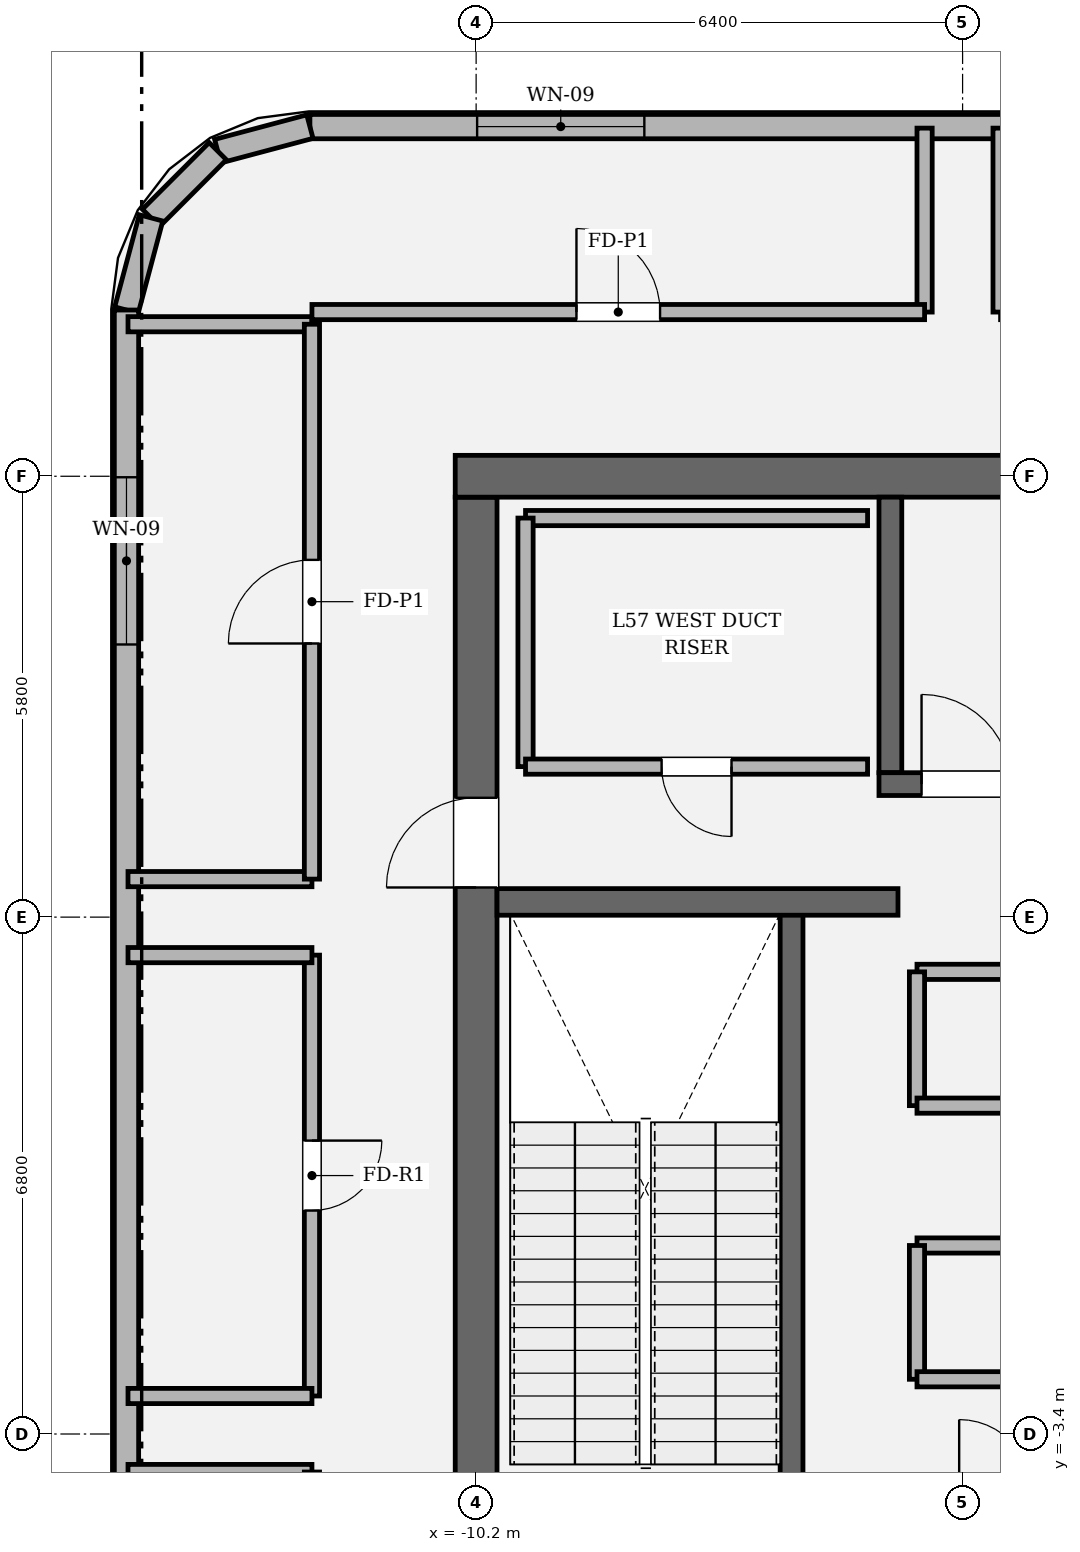
"""IFC4 building model, lengths in metres.
Left out: names, types, materials, properties, quantities, classifications, styles, units other than length and angle.
Written with IfcOpenShell. Run it as: python <this file> out.ifc"""

import sys

from ifc_helpers import new_model, si_unit, direction, frame, frame_2d, origin, place, context, subcontext, project, spatial, rectangle, extrude, element, fill, save


model = new_model("IFC4")
c1 = context("Model", 3, precision=1e-05, world=origin(), true_north=direction((0.0, 1.0)))
c2 = subcontext(c1, "Body", "Model", "MODEL_VIEW")
j1 = project(units=[si_unit("LENGTHUNIT", "METRE"), si_unit("PLANEANGLEUNIT", "RADIAN")], contexts=[c1])
p1 = place(None, origin())
s1 = spatial("IfcSite", under=j1, at=p1, CompositionType="ELEMENT")
p2 = place(p1, origin())
s2 = spatial("IfcBuilding", under=s1, at=p2, CompositionType="ELEMENT")
p3 = place(p2, frame((0.0, 0.0, 241.8)))
s3 = spatial("IfcBuildingStorey", under=s2, at=p3, CompositionType="ELEMENT", Elevation=241.8)
p4 = place(p3, frame((-10.2, -8.925, 0.0), z_axis=(0.0, 0.0, 1.0), x_axis=(0.0, 1.0, 0.0)))
e1 = element("IfcWall", 1, at=p4, inside=s3, PredefinedType="SHEAR", context=c2, shape_type="SweptSolid", body=[
    extrude(rectangle(XDim=17.85, YDim=0.55, at=frame_2d((8.925, 0.0))), origin(), (0.0, 0.0, 1.0), 4.8),
])
p5 = place(p4, frame((12.715, 0.0, 0.0)))
e2 = element("IfcOpeningElement", 2, at=p5, cuts=e1, PredefinedType="OPENING", context=c2, shape_type="SweptSolid", body=[
    extrude(rectangle(XDim=1.18, YDim=2.2, at=frame_2d((0.59, 1.1))), frame((0.0, 0.285, 0.0), z_axis=(0.0, -1.0, 0.0), x_axis=(1.0, 0.0, 0.0)), (0.0, 0.0, 1.0), 0.57),
])
p6 = place(p3, frame((-10.475, 9.2, 0.0), z_axis=(0.0, 0.0, 1.0), x_axis=(1.0, 0.0, 0.0)))
e3 = element("IfcWall", 3, at=p6, inside=s3, PredefinedType="SHEAR", context=c2, shape_type="SweptSolid", body=[
    extrude(rectangle(XDim=20.95, YDim=0.55, at=frame_2d((10.475, 0.0))), origin(), (0.0, 0.0, 1.0), 4.8),
])
p7 = place(p3, frame((-6.05, -5.5, 0.0), z_axis=(0.0, 0.0, 1.0), x_axis=(0.0, 1.0, 0.0)))
e4 = element("IfcWall", 4, at=p7, inside=s3, PredefinedType="SOLIDWALL", context=c2, shape_type="SweptSolid", body=[
    extrude(rectangle(XDim=8.95, YDim=0.3, at=frame_2d((4.475, 0.0))), origin(), (0.0, 0.0, 1.0), 4.8),
])
p8 = place(p3, frame((-4.75, 5.3, 0.0), z_axis=(0.0, 0.0, 1.0), x_axis=(0.0, 1.0, 0.0)))
e5 = element("IfcWall", 5, at=p8, inside=s3, PredefinedType="SOLIDWALL", context=c2, shape_type="SweptSolid", body=[
    extrude(rectangle(XDim=3.625, YDim=0.3, at=frame_2d((1.812, 0.0))), origin(), (0.0, 0.0, 1.0), 4.8),
])
p9 = place(p3, frame((-4.9, 5.15, 0.0), z_axis=(0.0, 0.0, 1.0), x_axis=(1.0, 0.0, 0.0)))
e6 = element("IfcWall", 6, at=p9, inside=s3, PredefinedType="SOLIDWALL", context=c2, shape_type="SweptSolid", body=[
    extrude(rectangle(XDim=9.8, YDim=0.3, at=frame_2d((4.9, 0.0))), origin(), (0.0, 0.0, 1.0), 4.8),
])
p10 = place(p9, frame((0.56, 0.0, 0.0)))
e7 = element("IfcOpeningElement", 7, at=p10, cuts=e6, PredefinedType="OPENING", context=c2, shape_type="SweptSolid", body=[
    extrude(rectangle(XDim=1.18, YDim=2.2, at=frame_2d((0.59, 1.1))), frame((0.0, 0.16, 0.0), z_axis=(0.0, -1.0, 0.0), x_axis=(1.0, 0.0, 0.0)), (0.0, 0.0, 1.0), 0.32),
])
p11 = place(p3, frame((-9.925, 3.6, 0.0), z_axis=(0.0, 0.0, 1.0), x_axis=(1.0, 0.0, 0.0)))
e8 = element("IfcWall", 8, at=p11, inside=s3, PredefinedType="SOLIDWALL", context=c2, shape_type="SweptSolid", body=[
    extrude(rectangle(XDim=5.275, YDim=0.35, at=frame_2d((2.638, 0.0))), origin(), (0.0, 0.0, 1.0), 4.8),
])
p12 = place(p3, frame((12.387, 13.8, 0.0), z_axis=(0.0, 0.0, 1.0), x_axis=(-1.0, 0.0, 0.0)))
e9 = element("IfcWall", 9, at=p12, inside=s3, PredefinedType="SOLIDWALL", context=c2, shape_type="SweptSolid", body=[
    extrude(rectangle(XDim=24.774, YDim=0.32, at=frame_2d((12.387, 0.0))), origin(), (0.0, 0.0, 1.0), 3.884),
])
p13 = place(p12, frame((2.2, 0.0, 0.9)))
e10 = element("IfcOpeningElement", 10, at=p13, cuts=e9, PredefinedType="OPENING", context=c2, shape_type="SweptSolid", body=[
    extrude(rectangle(XDim=2.2, YDim=1.2, at=frame_2d((1.1, 0.6))), frame((0.0, 0.17, 0.0), z_axis=(0.0, -1.0, 0.0), x_axis=(1.0, 0.0, 0.0)), (0.0, 0.0, 1.0), 0.34),
])
p14 = place(p12, frame((20.374, 0.0, 0.9)))
e11 = element("IfcOpeningElement", 11, at=p14, cuts=e9, PredefinedType="OPENING", context=c2, shape_type="SweptSolid", body=[
    extrude(rectangle(XDim=2.2, YDim=1.2, at=frame_2d((1.1, 0.6))), frame((0.0, 0.17, 0.0), z_axis=(0.0, -1.0, 0.0), x_axis=(1.0, 0.0, 0.0)), (0.0, 0.0, 1.0), 0.34),
])
p15 = place(p3, frame((-12.387, 13.8, 0.0), z_axis=(0.0, 0.0, 1.0), x_axis=(-0.966283375382, -0.25748094776, 0.0)))
e12 = element("IfcWall", 12, at=p15, inside=s3, PredefinedType="SOLIDWALL", context=c2, shape_type="SweptSolid", body=[
    extrude(rectangle(XDim=1.254, YDim=0.32, at=frame_2d((0.627, 0.0))), origin(), (0.0, 0.0, 1.0), 4.034),
])
p16 = place(p3, frame((-13.599, 13.477, 0.0), z_axis=(0.0, 0.0, 1.0), x_axis=(-0.707106781187, -0.707106781187, 0.0)))
e13 = element("IfcWall", 13, at=p16, inside=s3, PredefinedType="SOLIDWALL", context=c2, shape_type="SweptSolid", body=[
    extrude(rectangle(XDim=1.242, YDim=0.32, at=frame_2d((0.621, 0.0))), origin(), (0.0, 0.0, 1.0), 4.034),
])
p17 = place(p3, frame((-14.477, 12.599, 0.0), z_axis=(0.0, 0.0, 1.0), x_axis=(-0.25748094776, -0.966283375382, 0.0)))
e14 = element("IfcWall", 14, at=p17, inside=s3, PredefinedType="SOLIDWALL", context=c2, shape_type="SweptSolid", body=[
    extrude(rectangle(XDim=1.254, YDim=0.32, at=frame_2d((0.627, 0.0))), origin(), (0.0, 0.0, 1.0), 4.034),
])
p18 = place(p3, frame((-14.8, 11.387, 0.0), z_axis=(0.0, 0.0, 1.0), x_axis=(0.0, -1.0, 0.0)))
e15 = element("IfcWall", 15, at=p18, inside=s3, PredefinedType="SOLIDWALL", context=c2, shape_type="SweptSolid", body=[
    extrude(rectangle(XDim=22.774, YDim=0.32, at=frame_2d((11.387, 0.0))), origin(), (0.0, 0.0, 1.0), 3.884),
])
p19 = place(p18, frame((2.2, 0.0, 0.9)))
e16 = element("IfcOpeningElement", 16, at=p19, cuts=e15, PredefinedType="OPENING", context=c2, shape_type="SweptSolid", body=[
    extrude(rectangle(XDim=2.2, YDim=1.2, at=frame_2d((1.1, 0.6))), frame((0.0, 0.17, 0.0), z_axis=(0.0, -1.0, 0.0), x_axis=(1.0, 0.0, 0.0)), (0.0, 0.0, 1.0), 0.34),
])
p20 = place(p18, frame((18.374, 0.0, 0.9)))
e17 = element("IfcOpeningElement", 17, at=p20, cuts=e15, PredefinedType="OPENING", context=c2, shape_type="SweptSolid", body=[
    extrude(rectangle(XDim=2.2, YDim=1.2, at=frame_2d((1.1, 0.6))), frame((0.0, 0.17, 0.0), z_axis=(0.0, -1.0, 0.0), x_axis=(1.0, 0.0, 0.0)), (0.0, 0.0, 1.0), 0.34),
])
p21 = place(p3, frame((4.4, -0.92, 0.0), z_axis=(0.0, 0.0, 1.0), x_axis=(-1.0, 0.0, 0.0)))
e18 = element("IfcWall", 18, at=p21, inside=s3, PredefinedType="SOLIDWALL", context=c2, shape_type="SweptSolid", body=[
    extrude(rectangle(XDim=8.8, YDim=0.2, at=frame_2d((4.4, 0.0))), origin(), (0.0, 0.0, 1.0), 4.54),
])
p22 = place(p3, frame((-4.4, -0.92, 0.0), z_axis=(0.0, 0.0, 1.0), x_axis=(0.0, -1.0, 0.0)))
e19 = element("IfcWall", 19, at=p22, inside=s3, PredefinedType="SOLIDWALL", context=c2, shape_type="SweptSolid", body=[
    extrude(rectangle(XDim=1.76, YDim=0.2, at=frame_2d((0.88, 0.0))), origin(), (0.0, 0.0, 1.0), 4.54),
])
for number, where, z_axis, x_axis in (
    (20, (-4.4, -2.68, 0.0), (0.0, 0.0, 1.0), (1.0, 0.0, 0.0)),
    (21, (4.4, 2.68, 0.0), (0.0, 0.0, 1.0), (-1.0, 0.0, 0.0)),
):
    element("IfcWall", number, at=place(p3, frame(where, z_axis=z_axis, x_axis=x_axis)), inside=s3, PredefinedType="SOLIDWALL", context=c2, shape_type="SweptSolid", body=[
        extrude(rectangle(XDim=8.8, YDim=0.2, at=frame_2d((4.4, 0.0))), origin(), (0.0, 0.0, 1.0), 4.54),
    ])
p23 = place(p3, frame((-4.4, 2.68, 0.0), z_axis=(0.0, 0.0, 1.0), x_axis=(0.0, -1.0, 0.0)))
e22 = element("IfcWall", 22, at=p23, inside=s3, PredefinedType="SOLIDWALL", context=c2, shape_type="SweptSolid", body=[
    extrude(rectangle(XDim=1.76, YDim=0.2, at=frame_2d((0.88, 0.0))), origin(), (0.0, 0.0, 1.0), 4.54),
])
p24 = place(p3, frame((-4.4, 0.92, 0.0), z_axis=(0.0, 0.0, 1.0), x_axis=(1.0, 0.0, 0.0)))
e23 = element("IfcWall", 23, at=p24, inside=s3, PredefinedType="SOLIDWALL", context=c2, shape_type="SweptSolid", body=[
    extrude(rectangle(XDim=8.8, YDim=0.2, at=frame_2d((4.4, 0.0))), origin(), (0.0, 0.0, 1.0), 4.54),
])
p25 = place(p3, frame((-5.05, 8.65, 0.0), z_axis=(0.0, 0.0, 1.0), x_axis=(-1.0, 0.0, 0.0)))
e24 = element("IfcWall", 24, at=p25, inside=s3, PredefinedType="SOLIDWALL", context=c2, shape_type="SweptSolid", body=[
    extrude(rectangle(XDim=4.5, YDim=0.2, at=frame_2d((2.25, 0.0))), origin(), (0.0, 0.0, 1.0), 4.54),
])
p26 = place(p3, frame((-9.55, 8.65, 0.0), z_axis=(0.0, 0.0, 1.0), x_axis=(0.0, -1.0, 0.0)))
e25 = element("IfcWall", 25, at=p26, inside=s3, PredefinedType="SOLIDWALL", context=c2, shape_type="SweptSolid", body=[
    extrude(rectangle(XDim=3.27, YDim=0.2, at=frame_2d((1.635, 0.0))), origin(), (0.0, 0.0, 1.0), 4.54),
])
p27 = place(p3, frame((-9.55, 5.38, 0.0), z_axis=(0.0, 0.0, 1.0), x_axis=(1.0, 0.0, 0.0)))
e26 = element("IfcWall", 26, at=p27, inside=s3, PredefinedType="SOLIDWALL", context=c2, shape_type="SweptSolid", body=[
    extrude(rectangle(XDim=4.5, YDim=0.2, at=frame_2d((2.25, 0.0))), origin(), (0.0, 0.0, 1.0), 4.54),
])
p28 = place(p27, frame((1.79, 0.0, 0.0)))
e27 = element("IfcOpeningElement", 27, at=p28, cuts=e26, PredefinedType="OPENING", context=c2, shape_type="SweptSolid", body=[
    extrude(rectangle(XDim=0.92, YDim=2.1, at=frame_2d((0.46, 1.05))), frame((0.0, 0.11, 0.0), z_axis=(0.0, -1.0, 0.0), x_axis=(1.0, 0.0, 0.0)), (0.0, 0.0, 1.0), 0.22),
])
p29 = place(p3, frame((-14.78, -3.9, 0.0), z_axis=(0.0, 0.0, 1.0), x_axis=(1.0, 0.0, 0.0)))
e28 = element("IfcWall", 28, at=p29, inside=s3, PredefinedType="SOLIDWALL", context=c2, shape_type="SweptSolid", body=[
    extrude(rectangle(XDim=2.42, YDim=0.2, at=frame_2d((1.21, 0.0))), origin(), (0.0, 0.0, 1.0), 4.034),
])
p30 = place(p3, frame((-12.36, -3.9, 0.0), z_axis=(0.0, 0.0, 1.0), x_axis=(0.0, -1.0, 0.0)))
e29 = element("IfcWall", 29, at=p30, inside=s3, PredefinedType="SOLIDWALL", context=c2, shape_type="SweptSolid", body=[
    extrude(rectangle(XDim=7.3, YDim=0.2, at=frame_2d((3.65, 0.0))), origin(), (0.0, 0.0, 1.0), 4.54),
])
p31 = place(p30, frame((3.1, 0.0, 0.0)))
e30 = element("IfcOpeningElement", 30, at=p31, cuts=e29, PredefinedType="OPENING", context=c2, shape_type="SweptSolid", body=[
    extrude(rectangle(XDim=1.1, YDim=2.2, at=frame_2d((0.55, 1.1))), frame((0.0, 0.11, 0.0), z_axis=(0.0, -1.0, 0.0), x_axis=(1.0, 0.0, 0.0)), (0.0, 0.0, 1.0), 0.22),
])
p32 = place(p3, frame((-12.36, 2.9, 0.0), z_axis=(0.0, 0.0, 1.0), x_axis=(0.0, -1.0, 0.0)))
e31 = element("IfcWall", 31, at=p32, inside=s3, PredefinedType="SOLIDWALL", context=c2, shape_type="SweptSolid", body=[
    extrude(rectangle(XDim=5.8, YDim=0.2, at=frame_2d((2.9, 0.0))), origin(), (0.0, 0.0, 1.0), 4.54),
])
p33 = place(p32, frame((2.44, 0.0, 0.0)))
e32 = element("IfcOpeningElement", 32, at=p33, cuts=e31, PredefinedType="OPENING", context=c2, shape_type="SweptSolid", body=[
    extrude(rectangle(XDim=0.92, YDim=2.1, at=frame_2d((0.46, 1.05))), frame((0.0, 0.11, 0.0), z_axis=(0.0, -1.0, 0.0), x_axis=(1.0, 0.0, 0.0)), (0.0, 0.0, 1.0), 0.22),
])
for number, where, z_axis, x_axis in (
    (33, (-12.36, -2.9, 0.0), (0.0, 0.0, 1.0), (-1.0, 0.0, 0.0)),
    (34, (-14.78, 2.9, 0.0), (0.0, 0.0, 1.0), (1.0, 0.0, 0.0)),
    (35, (-12.36, 3.9, 0.0), (0.0, 0.0, 1.0), (-1.0, 0.0, 0.0)),
    (36, (-14.78, 11.2, 0.0), (0.0, 0.0, 1.0), (1.0, 0.0, 0.0)),
):
    element("IfcWall", number, at=place(p3, frame(where, z_axis=z_axis, x_axis=x_axis)), inside=s3, PredefinedType="SOLIDWALL", context=c2, shape_type="SweptSolid", body=[
        extrude(rectangle(XDim=2.42, YDim=0.2, at=frame_2d((1.21, 0.0))), origin(), (0.0, 0.0, 1.0), 4.034),
    ])
p34 = place(p3, frame((-12.36, 11.2, 0.0), z_axis=(0.0, 0.0, 1.0), x_axis=(0.0, -1.0, 0.0)))
e37 = element("IfcWall", 37, at=p34, inside=s3, PredefinedType="SOLIDWALL", context=c2, shape_type="SweptSolid", body=[
    extrude(rectangle(XDim=7.3, YDim=0.2, at=frame_2d((3.65, 0.0))), origin(), (0.0, 0.0, 1.0), 4.54),
])
p35 = place(p34, frame((3.1, 0.0, 0.0)))
e38 = element("IfcOpeningElement", 38, at=p35, cuts=e37, PredefinedType="OPENING", context=c2, shape_type="SweptSolid", body=[
    extrude(rectangle(XDim=1.1, YDim=2.2, at=frame_2d((0.55, 1.1))), frame((0.0, 0.11, 0.0), z_axis=(0.0, -1.0, 0.0), x_axis=(1.0, 0.0, 0.0)), (0.0, 0.0, 1.0), 0.22),
])
p36 = place(p3, frame((-4.3, 13.78, 0.0), z_axis=(0.0, 0.0, 1.0), x_axis=(0.0, -1.0, 0.0)))
e39 = element("IfcWall", 39, at=p36, inside=s3, PredefinedType="SOLIDWALL", context=c2, shape_type="SweptSolid", body=[
    extrude(rectangle(XDim=2.42, YDim=0.2, at=frame_2d((1.21, 0.0))), origin(), (0.0, 0.0, 1.0), 4.034),
])
p37 = place(p3, frame((-4.3, 11.36, 0.0), z_axis=(0.0, 0.0, 1.0), x_axis=(-1.0, 0.0, 0.0)))
e40 = element("IfcWall", 40, at=p37, inside=s3, PredefinedType="SOLIDWALL", context=c2, shape_type="SweptSolid", body=[
    extrude(rectangle(XDim=8.06, YDim=0.2, at=frame_2d((4.03, 0.0))), origin(), (0.0, 0.0, 1.0), 4.54),
])
p38 = place(p37, frame((3.48, 0.0, 0.0)))
e41 = element("IfcOpeningElement", 41, at=p38, cuts=e40, PredefinedType="OPENING", context=c2, shape_type="SweptSolid", body=[
    extrude(rectangle(XDim=1.1, YDim=2.2, at=frame_2d((0.55, 1.1))), frame((0.0, 0.11, 0.0), z_axis=(0.0, -1.0, 0.0), x_axis=(1.0, 0.0, 0.0)), (0.0, 0.0, 1.0), 0.22),
])
p39 = place(p3, frame((-3.3, 11.36, 0.0), z_axis=(0.0, 0.0, 1.0), x_axis=(0.0, 1.0, 0.0)))
e42 = element("IfcWall", 42, at=p39, inside=s3, PredefinedType="SOLIDWALL", context=c2, shape_type="SweptSolid", body=[
    extrude(rectangle(XDim=2.42, YDim=0.2, at=frame_2d((1.21, 0.0))), origin(), (0.0, 0.0, 1.0), 4.034),
])
p40 = place(p14, origin())
e43 = element("IfcWindow", 43, at=p40, inside=s3, PartitioningType="SINGLE_PANEL", PredefinedType="WINDOW", context=c2, shape_type="SweptSolid", body=[
    extrude(rectangle(XDim=2.2, YDim=1.2, at=frame_2d((1.1, 0.6))), frame((0.0, 0.03, 0.0), z_axis=(0.0, -1.0, 0.0), x_axis=(1.0, 0.0, 0.0)), (0.0, 0.0, 1.0), 0.06),
])
fill(e11, e43)
p41 = place(p19, origin())
e44 = element("IfcWindow", 44, at=p41, inside=s3, PartitioningType="SINGLE_PANEL", PredefinedType="WINDOW", context=c2, shape_type="SweptSolid", body=[
    extrude(rectangle(XDim=2.2, YDim=1.2, at=frame_2d((1.1, 0.6))), frame((0.0, 0.03, 0.0), z_axis=(0.0, -1.0, 0.0), x_axis=(1.0, 0.0, 0.0)), (0.0, 0.0, 1.0), 0.06),
])
fill(e16, e44)
p42 = place(p10, origin())
e45 = element("IfcDoor", 45, at=p42, inside=s3, OperationType="SINGLE_SWING_LEFT", PredefinedType="DOOR", context=c2, shape_type="SweptSolid", body=[
    extrude(rectangle(XDim=1.18, YDim=2.2, at=frame_2d((0.59, 1.1))), frame((0.0, 0.025, 0.0), z_axis=(0.0, -1.0, 0.0), x_axis=(1.0, 0.0, 0.0)), (0.0, 0.0, 1.0), 0.05),
])
fill(e7, e45)
p43 = place(p5, origin())
e46 = element("IfcDoor", 46, at=p43, inside=s3, OperationType="SINGLE_SWING_LEFT", PredefinedType="DOOR", context=c2, shape_type="SweptSolid", body=[
    extrude(rectangle(XDim=1.18, YDim=2.2, at=frame_2d((0.59, 1.1))), frame((0.0, 0.025, 0.0), z_axis=(0.0, -1.0, 0.0), x_axis=(1.0, 0.0, 0.0)), (0.0, 0.0, 1.0), 0.05),
])
fill(e2, e46)
p44 = place(p28, origin())
e47 = element("IfcDoor", 47, at=p44, inside=s3, OperationType="SINGLE_SWING_RIGHT", PredefinedType="DOOR", context=c2, shape_type="SweptSolid", body=[
    extrude(rectangle(XDim=0.92, YDim=2.1, at=frame_2d((0.46, 1.05))), frame((0.0, 0.025, 0.0), z_axis=(0.0, -1.0, 0.0), x_axis=(1.0, 0.0, 0.0)), (0.0, 0.0, 1.0), 0.05),
])
fill(e27, e47)
p45 = place(p33, origin())
e48 = element("IfcDoor", 48, at=p45, inside=s3, OperationType="SINGLE_SWING_LEFT", PredefinedType="DOOR", context=c2, shape_type="SweptSolid", body=[
    extrude(rectangle(XDim=0.92, YDim=2.1, at=frame_2d((0.46, 1.05))), frame((0.0, 0.025, 0.0), z_axis=(0.0, -1.0, 0.0), x_axis=(1.0, 0.0, 0.0)), (0.0, 0.0, 1.0), 0.05),
])
fill(e32, e48)
p46 = place(p35, origin())
e49 = element("IfcDoor", 49, at=p46, inside=s3, OperationType="SINGLE_SWING_RIGHT", PredefinedType="DOOR", context=c2, shape_type="SweptSolid", body=[
    extrude(rectangle(XDim=1.1, YDim=2.2, at=frame_2d((0.55, 1.1))), frame((0.0, 0.025, 0.0), z_axis=(0.0, -1.0, 0.0), x_axis=(1.0, 0.0, 0.0)), (0.0, 0.0, 1.0), 0.05),
])
fill(e38, e49)
p47 = place(p38, origin())
e50 = element("IfcDoor", 50, at=p47, inside=s3, OperationType="SINGLE_SWING_RIGHT", PredefinedType="DOOR", context=c2, shape_type="SweptSolid", body=[
    extrude(rectangle(XDim=1.1, YDim=2.2, at=frame_2d((0.55, 1.1))), frame((0.0, 0.025, 0.0), z_axis=(0.0, -1.0, 0.0), x_axis=(1.0, 0.0, 0.0)), (0.0, 0.0, 1.0), 0.05),
])
fill(e41, e50)
save(model, sys.argv[1])
